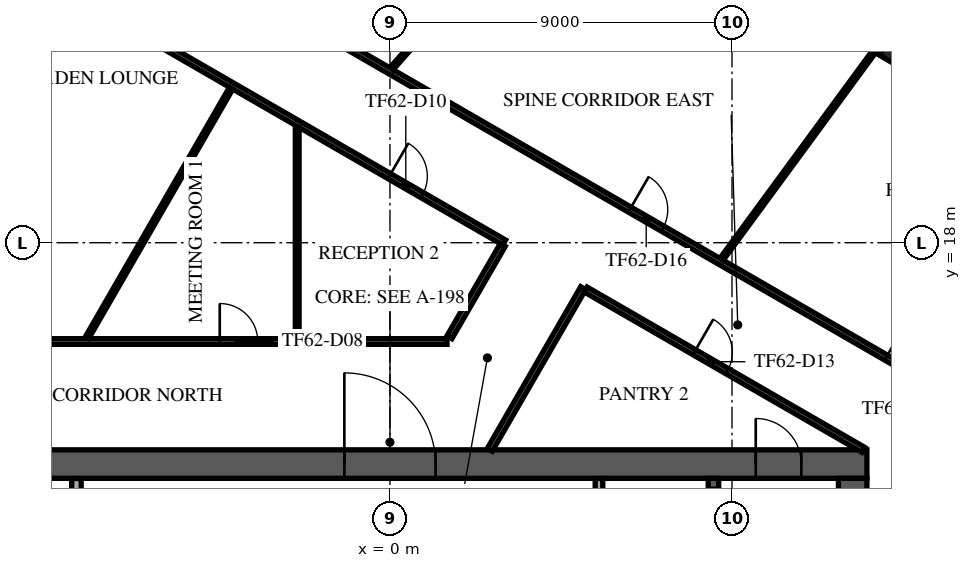
"""IFC4 building model, lengths in metres.
Left out: names, types, materials, properties, quantities, classifications, styles, units other than length and angle.
Written with IfcOpenShell. Run it as: python <this file> out.ifc"""

import sys

from ifc_helpers import new_model, si_unit, direction, frame, frame_2d, origin, origin_2d, place, context, subcontext, project, spatial, rectangle, extrude, element, fill, save


model = new_model("IFC4")
c1 = context("Model", 3, precision=1e-05, world=origin(), true_north=direction((0.0, 1.0)))
c2 = subcontext(c1, "Body", "Model", "MODEL_VIEW")
j1 = project(units=[si_unit("LENGTHUNIT", "METRE"), si_unit("PLANEANGLEUNIT", "RADIAN")], contexts=[c1])
p1 = place(None, origin())
s1 = spatial("IfcSite", under=j1, at=p1, CompositionType="ELEMENT")
p2 = place(p1, origin())
s2 = spatial("IfcBuilding", under=s1, at=p2, CompositionType="ELEMENT")
p3 = place(p2, frame((0.0, 0.0, 262.9)))
s3 = spatial("IfcBuildingStorey", under=s2, at=p3, CompositionType="ELEMENT", Elevation=262.9)
p4 = place(p3, frame((13.499, 23.094, 0.0), z_axis=(0.0, 0.0, 1.0), x_axis=(0.504643651291, 0.863327739165, 0.0)))
e1 = element("IfcColumn", 1, at=p4, inside=s3, PredefinedType="COLUMN", context=c2, shape_type="SweptSolid", body=[
    extrude(rectangle(XDim=0.9, YDim=0.9, at=origin_2d()), origin(), (0.0, 0.0, 1.0), 4.0),
])
p5 = place(p3, frame((-12.55, 12.175, 0.0), z_axis=(0.0, 0.0, 1.0), x_axis=(1.0, 0.0, 0.0)))
e2 = element("IfcWall", 2, at=p5, inside=s3, PredefinedType="SHEAR", context=c2, shape_type="SweptSolid", body=[
    extrude(rectangle(XDim=25.1, YDim=0.75, at=frame_2d((12.55, 0.0))), origin(), (0.0, 0.0, 1.0), 3.64),
])
p6 = place(p5, frame((11.35, 0.0, 0.0)))
e3 = element("IfcOpeningElement", 3, at=p6, cuts=e2, PredefinedType="OPENING", context=c2, shape_type="SweptSolid", body=[
    extrude(rectangle(XDim=2.4, YDim=2.4, at=frame_2d((1.2, 1.2))), frame((0.0, 0.385, 0.0), z_axis=(0.0, -1.0, 0.0), x_axis=(1.0, 0.0, 0.0)), (0.0, 0.0, 1.0), 0.77),
])
p7 = place(p5, frame((22.175, 0.0, 0.0)))
e4 = element("IfcOpeningElement", 4, at=p7, cuts=e2, PredefinedType="OPENING", context=c2, shape_type="SweptSolid", body=[
    extrude(rectangle(XDim=1.2, YDim=2.1, at=frame_2d((0.6, 1.05))), frame((0.0, 0.385, 0.0), z_axis=(0.0, -1.0, 0.0), x_axis=(1.0, 0.0, 0.0)), (0.0, 0.0, 1.0), 0.77),
])
p8 = place(p5, frame((1.15, 0.0, 0.0)))
e5 = element("IfcOpeningElement", 5, at=p8, cuts=e2, PredefinedType="OPENING", context=c2, shape_type="SweptSolid", body=[
    extrude(rectangle(XDim=1.0, YDim=2.1, at=frame_2d((0.5, 1.05))), frame((0.0, 0.385, 0.0), z_axis=(0.0, -1.0, 0.0), x_axis=(1.0, 0.0, 0.0)), (0.0, 0.0, 1.0), 0.77),
])
p9 = place(p3, frame((12.175, -11.8, 0.0), z_axis=(0.0, 0.0, 1.0), x_axis=(0.0, 1.0, 0.0)))
e6 = element("IfcWall", 6, at=p9, inside=s3, PredefinedType="SHEAR", context=c2, shape_type="SweptSolid", body=[
    extrude(rectangle(XDim=23.6, YDim=0.75, at=frame_2d((11.8, 0.0))), origin(), (0.0, 0.0, 1.0), 3.64),
])
p10 = place(p9, frame((10.6, 0.0, 0.0)))
e7 = element("IfcOpeningElement", 7, at=p10, cuts=e6, PredefinedType="OPENING", context=c2, shape_type="SweptSolid", body=[
    extrude(rectangle(XDim=2.4, YDim=2.4, at=frame_2d((1.2, 1.2))), frame((0.0, 0.385, 0.0), z_axis=(0.0, -1.0, 0.0), x_axis=(1.0, 0.0, 0.0)), (0.0, 0.0, 1.0), 0.77),
])
p11 = place(p3, frame((8.512, 4.55, 0.0), z_axis=(0.0, 0.0, 1.0), x_axis=(0.0, 1.0, 0.0)))
e8 = element("IfcWall", 8, at=p11, inside=s3, PredefinedType="SOLIDWALL", context=c2, shape_type="SweptSolid", body=[
    extrude(rectangle(XDim=7.25, YDim=0.275, at=frame_2d((3.625, 0.0))), origin(), (0.0, 0.0, 1.0), 3.64),
])
p12 = place(p11, frame((6.0, 0.0, 0.0)))
e9 = element("IfcOpeningElement", 9, at=p12, cuts=e8, PredefinedType="OPENING", context=c2, shape_type="SweptSolid", body=[
    extrude(rectangle(XDim=1.0, YDim=2.1, at=frame_2d((0.5, 1.05))), frame((0.0, 0.147, 0.0), z_axis=(0.0, -1.0, 0.0), x_axis=(1.0, 0.0, 0.0)), (0.0, 0.0, 1.0), 0.295),
])
p13 = place(p3, frame((-8.25, 8.805, 0.0), z_axis=(0.0, 0.0, 1.0), x_axis=(0.0, 1.0, 0.0)))
e10 = element("IfcWall", 10, at=p13, inside=s3, PredefinedType="PARTITIONING", context=c2, shape_type="SweptSolid", body=[
    extrude(rectangle(XDim=2.99, YDim=0.25, at=frame_2d((1.495, 0.0))), origin(), (0.0, 0.0, 1.0), 3.64),
])
p14 = place(p13, frame((0.895, 0.0, 0.0)))
e11 = element("IfcOpeningElement", 11, at=p14, cuts=e10, PredefinedType="OPENING", context=c2, shape_type="SweptSolid", body=[
    extrude(rectangle(XDim=1.0, YDim=2.1, at=frame_2d((0.5, 1.05))), frame((0.0, 0.135, 0.0), z_axis=(0.0, -1.0, 0.0), x_axis=(1.0, 0.0, 0.0)), (0.0, 0.0, 1.0), 0.27),
])
p15 = place(p3, frame((5.5, 8.805, 0.0), z_axis=(0.0, 0.0, 1.0), x_axis=(0.0, 1.0, 0.0)))
e12 = element("IfcWall", 12, at=p15, inside=s3, PredefinedType="PARTITIONING", context=c2, shape_type="SweptSolid", body=[
    extrude(rectangle(XDim=2.99, YDim=0.2, at=frame_2d((1.495, 0.0))), origin(), (0.0, 0.0, 1.0), 3.64),
])
p16 = place(p15, frame((0.532, 0.0, 0.0)))
e13 = element("IfcOpeningElement", 13, at=p16, cuts=e12, PredefinedType="OPENING", context=c2, shape_type="SweptSolid", body=[
    extrude(rectangle(XDim=1.8, YDim=2.1, at=frame_2d((0.9, 1.05))), frame((0.0, 0.11, 0.0), z_axis=(0.0, -1.0, 0.0), x_axis=(1.0, 0.0, 0.0)), (0.0, 0.0, 1.0), 0.22),
])
p17 = place(p3, frame((-8.015, 32.917, 0.0), z_axis=(0.0, 0.0, 1.0), x_axis=(-0.500001675963, -0.866024436165, 0.0)))
e14 = element("IfcWall", 14, at=p17, inside=s3, PredefinedType="STANDARD", context=c2, shape_type="SweptSolid", body=[
    extrude(rectangle(XDim=48.843, YDim=0.6, at=frame_2d((24.421, 0.0))), origin(), (0.0, 0.0, 1.0), 3.64),
])
p18 = place(p17, frame((1.22, 0.0, 0.9)))
e15 = element("IfcOpeningElement", 15, at=p18, cuts=e14, PredefinedType="OPENING", context=c2, shape_type="SweptSolid", body=[
    extrude(rectangle(XDim=2.0, YDim=2.1, at=frame_2d((1.0, 1.05))), frame((0.0, 0.31, 0.0), z_axis=(0.0, -1.0, 0.0), x_axis=(1.0, 0.0, 0.0)), (0.0, 0.0, 1.0), 0.62),
])
p19 = place(p17, frame((5.66, 0.0, 0.9)))
e16 = element("IfcOpeningElement", 16, at=p19, cuts=e14, PredefinedType="OPENING", context=c2, shape_type="SweptSolid", body=[
    extrude(rectangle(XDim=2.0, YDim=2.1, at=frame_2d((1.0, 1.05))), frame((0.0, 0.31, 0.0), z_axis=(0.0, -1.0, 0.0), x_axis=(1.0, 0.0, 0.0)), (0.0, 0.0, 1.0), 0.62),
])
p20 = place(p17, frame((10.101, 0.0, 0.9)))
e17 = element("IfcOpeningElement", 17, at=p20, cuts=e14, PredefinedType="OPENING", context=c2, shape_type="SweptSolid", body=[
    extrude(rectangle(XDim=2.0, YDim=2.1, at=frame_2d((1.0, 1.05))), frame((0.0, 0.31, 0.0), z_axis=(0.0, -1.0, 0.0), x_axis=(1.0, 0.0, 0.0)), (0.0, 0.0, 1.0), 0.62),
])
p21 = place(p17, frame((14.541, 0.0, 0.9)))
e18 = element("IfcOpeningElement", 18, at=p21, cuts=e14, PredefinedType="OPENING", context=c2, shape_type="SweptSolid", body=[
    extrude(rectangle(XDim=2.0, YDim=2.1, at=frame_2d((1.0, 1.05))), frame((0.0, 0.31, 0.0), z_axis=(0.0, -1.0, 0.0), x_axis=(1.0, 0.0, 0.0)), (0.0, 0.0, 1.0), 0.62),
])
p22 = place(p17, frame((18.981, 0.0, 0.9)))
e19 = element("IfcOpeningElement", 19, at=p22, cuts=e14, PredefinedType="OPENING", context=c2, shape_type="SweptSolid", body=[
    extrude(rectangle(XDim=2.0, YDim=2.1, at=frame_2d((1.0, 1.05))), frame((0.0, 0.31, 0.0), z_axis=(0.0, -1.0, 0.0), x_axis=(1.0, 0.0, 0.0)), (0.0, 0.0, 1.0), 0.62),
])
p23 = place(p17, frame((23.422, 0.0, 0.9)))
e20 = element("IfcOpeningElement", 20, at=p23, cuts=e14, PredefinedType="OPENING", context=c2, shape_type="SweptSolid", body=[
    extrude(rectangle(XDim=2.0, YDim=2.1, at=frame_2d((1.0, 1.05))), frame((0.0, 0.31, 0.0), z_axis=(0.0, -1.0, 0.0), x_axis=(1.0, 0.0, 0.0)), (0.0, 0.0, 1.0), 0.62),
])
p24 = place(p17, frame((27.862, 0.0, 0.9)))
e21 = element("IfcOpeningElement", 21, at=p24, cuts=e14, PredefinedType="OPENING", context=c2, shape_type="SweptSolid", body=[
    extrude(rectangle(XDim=2.0, YDim=2.1, at=frame_2d((1.0, 1.05))), frame((0.0, 0.31, 0.0), z_axis=(0.0, -1.0, 0.0), x_axis=(1.0, 0.0, 0.0)), (0.0, 0.0, 1.0), 0.62),
])
p25 = place(p17, frame((32.302, 0.0, 0.9)))
e22 = element("IfcOpeningElement", 22, at=p25, cuts=e14, PredefinedType="OPENING", context=c2, shape_type="SweptSolid", body=[
    extrude(rectangle(XDim=2.0, YDim=2.1, at=frame_2d((1.0, 1.05))), frame((0.0, 0.31, 0.0), z_axis=(0.0, -1.0, 0.0), x_axis=(1.0, 0.0, 0.0)), (0.0, 0.0, 1.0), 0.62),
])
p26 = place(p17, frame((36.742, 0.0, 0.9)))
e23 = element("IfcOpeningElement", 23, at=p26, cuts=e14, PredefinedType="OPENING", context=c2, shape_type="SweptSolid", body=[
    extrude(rectangle(XDim=2.0, YDim=2.1, at=frame_2d((1.0, 1.05))), frame((0.0, 0.31, 0.0), z_axis=(0.0, -1.0, 0.0), x_axis=(1.0, 0.0, 0.0)), (0.0, 0.0, 1.0), 0.62),
])
p27 = place(p17, frame((41.183, 0.0, 0.9)))
e24 = element("IfcOpeningElement", 24, at=p27, cuts=e14, PredefinedType="OPENING", context=c2, shape_type="SweptSolid", body=[
    extrude(rectangle(XDim=2.0, YDim=2.1, at=frame_2d((1.0, 1.05))), frame((0.0, 0.31, 0.0), z_axis=(0.0, -1.0, 0.0), x_axis=(1.0, 0.0, 0.0)), (0.0, 0.0, 1.0), 0.62),
])
p28 = place(p17, frame((45.623, 0.0, 0.9)))
e25 = element("IfcOpeningElement", 25, at=p28, cuts=e14, PredefinedType="OPENING", context=c2, shape_type="SweptSolid", body=[
    extrude(rectangle(XDim=2.0, YDim=2.1, at=frame_2d((1.0, 1.05))), frame((0.0, 0.31, 0.0), z_axis=(0.0, -1.0, 0.0), x_axis=(1.0, 0.0, 0.0)), (0.0, 0.0, 1.0), 0.62),
])
p29 = place(p3, frame((30.476, 16.699, 0.0), z_axis=(0.0, 0.0, 1.0), x_axis=(-0.866025061514, 0.500000592829, 0.0)))
e26 = element("IfcWall", 26, at=p29, inside=s3, PredefinedType="STANDARD", context=c2, shape_type="SweptSolid", body=[
    extrude(rectangle(XDim=36.243, YDim=0.6, at=frame_2d((18.122, 0.0))), origin(), (0.0, 0.0, 1.0), 3.64),
])
p30 = place(p29, frame((1.215, 0.0, 0.9)))
e27 = element("IfcOpeningElement", 27, at=p30, cuts=e26, PredefinedType="OPENING", context=c2, shape_type="SweptSolid", body=[
    extrude(rectangle(XDim=2.1, YDim=2.1, at=frame_2d((1.05, 1.05))), frame((0.0, 0.31, 0.0), z_axis=(0.0, -1.0, 0.0), x_axis=(1.0, 0.0, 0.0)), (0.0, 0.0, 1.0), 0.62),
])
p31 = place(p29, frame((5.746, 0.0, 0.9)))
e28 = element("IfcOpeningElement", 28, at=p31, cuts=e26, PredefinedType="OPENING", context=c2, shape_type="SweptSolid", body=[
    extrude(rectangle(XDim=2.1, YDim=2.1, at=frame_2d((1.05, 1.05))), frame((0.0, 0.31, 0.0), z_axis=(0.0, -1.0, 0.0), x_axis=(1.0, 0.0, 0.0)), (0.0, 0.0, 1.0), 0.62),
])
p32 = place(p29, frame((10.276, 0.0, 0.9)))
e29 = element("IfcOpeningElement", 29, at=p32, cuts=e26, PredefinedType="OPENING", context=c2, shape_type="SweptSolid", body=[
    extrude(rectangle(XDim=2.1, YDim=2.1, at=frame_2d((1.05, 1.05))), frame((0.0, 0.31, 0.0), z_axis=(0.0, -1.0, 0.0), x_axis=(1.0, 0.0, 0.0)), (0.0, 0.0, 1.0), 0.62),
])
p33 = place(p29, frame((14.806, 0.0, 0.9)))
e30 = element("IfcOpeningElement", 30, at=p33, cuts=e26, PredefinedType="OPENING", context=c2, shape_type="SweptSolid", body=[
    extrude(rectangle(XDim=2.1, YDim=2.1, at=frame_2d((1.05, 1.05))), frame((0.0, 0.31, 0.0), z_axis=(0.0, -1.0, 0.0), x_axis=(1.0, 0.0, 0.0)), (0.0, 0.0, 1.0), 0.62),
])
p34 = place(p29, frame((19.337, 0.0, 0.9)))
e31 = element("IfcOpeningElement", 31, at=p34, cuts=e26, PredefinedType="OPENING", context=c2, shape_type="SweptSolid", body=[
    extrude(rectangle(XDim=2.1, YDim=2.1, at=frame_2d((1.05, 1.05))), frame((0.0, 0.31, 0.0), z_axis=(0.0, -1.0, 0.0), x_axis=(1.0, 0.0, 0.0)), (0.0, 0.0, 1.0), 0.62),
])
p35 = place(p29, frame((23.867, 0.0, 0.9)))
e32 = element("IfcOpeningElement", 32, at=p35, cuts=e26, PredefinedType="OPENING", context=c2, shape_type="SweptSolid", body=[
    extrude(rectangle(XDim=2.1, YDim=2.1, at=frame_2d((1.05, 1.05))), frame((0.0, 0.31, 0.0), z_axis=(0.0, -1.0, 0.0), x_axis=(1.0, 0.0, 0.0)), (0.0, 0.0, 1.0), 0.62),
])
p36 = place(p29, frame((28.398, 0.0, 0.9)))
e33 = element("IfcOpeningElement", 33, at=p36, cuts=e26, PredefinedType="OPENING", context=c2, shape_type="SweptSolid", body=[
    extrude(rectangle(XDim=2.1, YDim=2.1, at=frame_2d((1.05, 1.05))), frame((0.0, 0.31, 0.0), z_axis=(0.0, -1.0, 0.0), x_axis=(1.0, 0.0, 0.0)), (0.0, 0.0, 1.0), 0.62),
])
p37 = place(p29, frame((32.928, 0.0, 0.9)))
e34 = element("IfcOpeningElement", 34, at=p37, cuts=e26, PredefinedType="OPENING", context=c2, shape_type="SweptSolid", body=[
    extrude(rectangle(XDim=2.1, YDim=2.1, at=frame_2d((1.05, 1.05))), frame((0.0, 0.31, 0.0), z_axis=(0.0, -1.0, 0.0), x_axis=(1.0, 0.0, 0.0)), (0.0, 0.0, 1.0), 0.62),
])
p38 = place(p3, frame((-15.325, 15.4, 0.0), z_axis=(0.0, 0.0, 1.0), x_axis=(1.0, 0.0, 0.0)))
e35 = element("IfcWall", 35, at=p38, inside=s3, PredefinedType="PARTITIONING", context=c2, shape_type="SweptSolid", body=[
    extrude(rectangle(XDim=16.826, YDim=0.15, at=frame_2d((8.413, 0.0))), origin(), (0.0, 0.0, 1.0), 3.24),
])
p39 = place(p38, frame((3.3, 0.0, 0.0)))
e36 = element("IfcOpeningElement", 36, at=p39, cuts=e35, PredefinedType="OPENING", context=c2, shape_type="SweptSolid", body=[
    extrude(rectangle(XDim=1.8, YDim=2.1, at=frame_2d((0.9, 1.05))), frame((0.0, 0.085, 0.0), z_axis=(0.0, -1.0, 0.0), x_axis=(1.0, 0.0, 0.0)), (0.0, 0.0, 1.0), 0.17),
])
p40 = place(p38, frame((10.846, 0.0, 0.0)))
e37 = element("IfcOpeningElement", 37, at=p40, cuts=e35, PredefinedType="OPENING", context=c2, shape_type="SweptSolid", body=[
    extrude(rectangle(XDim=1.0, YDim=2.1, at=frame_2d((0.5, 1.05))), frame((0.0, 0.085, 0.0), z_axis=(0.0, -1.0, 0.0), x_axis=(1.0, 0.0, 0.0)), (0.0, 0.0, 1.0), 0.17),
])
p41 = place(p3, frame((-8.447, 24.618, 0.0), z_axis=(0.0, 0.0, 1.0), x_axis=(0.866030646256, -0.499990919662, 0.0)))
e38 = element("IfcWall", 38, at=p41, inside=s3, PredefinedType="PARTITIONING", context=c2, shape_type="SweptSolid", body=[
    extrude(rectangle(XDim=13.225, YDim=0.15, at=frame_2d((6.612, 0.0))), origin(), (0.0, 0.0, 1.0), 3.04),
])
p42 = place(p41, frame((0.55, 0.0, 0.0)))
e39 = element("IfcOpeningElement", 39, at=p42, cuts=e38, PredefinedType="OPENING", context=c2, shape_type="SweptSolid", body=[
    extrude(rectangle(XDim=1.0, YDim=2.1, at=frame_2d((0.5, 1.05))), frame((0.0, 0.085, 0.0), z_axis=(0.0, -1.0, 0.0), x_axis=(1.0, 0.0, 0.0)), (0.0, 0.0, 1.0), 0.17),
])
p43 = place(p41, frame((9.735, 0.0, 0.0)))
e40 = element("IfcOpeningElement", 40, at=p43, cuts=e38, PredefinedType="OPENING", context=c2, shape_type="SweptSolid", body=[
    extrude(rectangle(XDim=1.0, YDim=2.1, at=frame_2d((0.5, 1.05))), frame((0.0, 0.085, 0.0), z_axis=(0.0, -1.0, 0.0), x_axis=(1.0, 0.0, 0.0)), (0.0, 0.0, 1.0), 0.17),
])
p44 = place(p3, frame((-7.247, 26.698, 0.0), z_axis=(0.0, 0.0, 1.0), x_axis=(0.866022442497, -0.500005129065, 0.0)))
e41 = element("IfcWall", 41, at=p44, inside=s3, PredefinedType="PARTITIONING", context=c2, shape_type="SweptSolid", body=[
    extrude(rectangle(XDim=39.325, YDim=0.15, at=frame_2d((19.662, 0.0))), origin(), (0.0, 0.0, 1.0), 3.04),
])
p45 = place(p44, frame((15.654, 0.0, 0.0)))
e42 = element("IfcOpeningElement", 42, at=p45, cuts=e41, PredefinedType="OPENING", context=c2, shape_type="SweptSolid", body=[
    extrude(rectangle(XDim=1.0, YDim=2.1, at=frame_2d((0.5, 1.05))), frame((0.0, 0.085, 0.0), z_axis=(0.0, -1.0, 0.0), x_axis=(1.0, 0.0, 0.0)), (0.0, 0.0, 1.0), 0.17),
])
p46 = place(p44, frame((23.442, 0.0, 0.0)))
e43 = element("IfcOpeningElement", 43, at=p46, cuts=e41, PredefinedType="OPENING", context=c2, shape_type="SweptSolid", body=[
    extrude(rectangle(XDim=1.0, YDim=2.1, at=frame_2d((0.5, 1.05))), frame((0.0, 0.085, 0.0), z_axis=(0.0, -1.0, 0.0), x_axis=(1.0, 0.0, 0.0)), (0.0, 0.0, 1.0), 0.17),
])
p47 = place(p44, frame((31.841, 0.0, 0.0)))
e44 = element("IfcOpeningElement", 44, at=p47, cuts=e41, PredefinedType="OPENING", context=c2, shape_type="SweptSolid", body=[
    extrude(rectangle(XDim=1.0, YDim=2.1, at=frame_2d((0.5, 1.05))), frame((0.0, 0.085, 0.0), z_axis=(0.0, -1.0, 0.0), x_axis=(1.0, 0.0, 0.0)), (0.0, 0.0, 1.0), 0.17),
])
p48 = place(p44, frame((36.955, 0.0, 0.0)))
e45 = element("IfcOpeningElement", 45, at=p48, cuts=e41, PredefinedType="OPENING", context=c2, shape_type="SweptSolid", body=[
    extrude(rectangle(XDim=1.0, YDim=2.1, at=frame_2d((0.5, 1.05))), frame((0.0, 0.085, 0.0), z_axis=(0.0, -1.0, 0.0), x_axis=(1.0, 0.0, 0.0)), (0.0, 0.0, 1.0), 0.17),
])
p49 = place(p3, frame((1.566, 15.512, 0.0), z_axis=(0.0, 0.0, 1.0), x_axis=(0.500136902793, 0.865946348491, 0.0)))
e46 = element("IfcWall", 46, at=p49, inside=s3, PredefinedType="PARTITIONING", context=c2, shape_type="SweptSolid", body=[
    extrude(rectangle(XDim=2.804, YDim=0.15, at=frame_2d((1.402, 0.0))), origin(), (0.0, 0.0, 1.0), 3.64),
])
p50 = place(p3, frame((2.627, 12.55, 0.0), z_axis=(0.0, 0.0, 1.0), x_axis=(0.50013524008, 0.865947308807, 0.0)))
e47 = element("IfcWall", 47, at=p50, inside=s3, PredefinedType="PARTITIONING", context=c2, shape_type="SweptSolid", body=[
    extrude(rectangle(XDim=4.915, YDim=0.15, at=frame_2d((2.458, 0.0))), origin(), (0.0, 0.0, 1.0), 3.24),
])
p51 = place(p3, frame((5.15, 16.769, 0.0), z_axis=(0.0, 0.0, 1.0), x_axis=(0.866010168016, -0.500026388196, 0.0)))
e48 = element("IfcWall", 48, at=p51, inside=s3, PredefinedType="PARTITIONING", context=c2, shape_type="SweptSolid", body=[
    extrude(rectangle(XDim=8.437, YDim=0.15, at=frame_2d((4.218, 0.0))), origin(), (0.0, 0.0, 1.0), 3.24),
])
p52 = place(p51, frame((3.3, 0.0, 0.0)))
e49 = element("IfcOpeningElement", 49, at=p52, cuts=e48, PredefinedType="OPENING", context=c2, shape_type="SweptSolid", body=[
    extrude(rectangle(XDim=1.0, YDim=2.1, at=frame_2d((0.5, 1.05))), frame((0.0, 0.085, 0.0), z_axis=(0.0, -1.0, 0.0), x_axis=(1.0, 0.0, 0.0)), (0.0, 0.0, 1.0), 0.17),
])
p53 = place(p3, frame((-7.971, 15.5, 0.0), z_axis=(0.0, 0.0, 1.0), x_axis=(0.499964887799, 0.866045674874, 0.0)))
e50 = element("IfcWall", 50, at=p53, inside=s3, PredefinedType="PARTITIONING", context=c2, shape_type="SweptSolid", body=[
    extrude(rectangle(XDim=7.584, YDim=0.1, at=frame_2d((3.792, 0.0))), origin(), (0.0, 0.0, 1.0), 3.24),
])
p54 = place(p3, frame((-2.441, 15.475, 0.0), z_axis=(0.0, 0.0, 1.0), x_axis=(0.0, 1.0, 0.0)))
e51 = element("IfcWall", 51, at=p54, inside=s3, PredefinedType="PARTITIONING", context=c2, shape_type="SweptSolid", body=[
    extrude(rectangle(XDim=5.56, YDim=0.1, at=frame_2d((2.78, 0.0))), origin(), (0.0, 0.0, 1.0), 3.64),
])
p55 = place(p3, frame((0.045, 22.586, 0.0), z_axis=(0.0, 0.0, 1.0), x_axis=(0.662385571542, 0.749163102811, 0.0)))
e52 = element("IfcWall", 52, at=p55, inside=s3, PredefinedType="PARTITIONING", context=c2, shape_type="SweptSolid", body=[
    extrude(rectangle(XDim=10.016, YDim=0.1, at=frame_2d((5.008, 0.0))), origin(), (0.0, 0.0, 1.0), 3.04),
])
p56 = place(p3, frame((8.728, 17.567, 0.0), z_axis=(0.0, 0.0, 1.0), x_axis=(0.591764258376, 0.806111073307, 0.0)))
e53 = element("IfcWall", 53, at=p56, inside=s3, PredefinedType="PARTITIONING", context=c2, shape_type="SweptSolid", body=[
    extrude(rectangle(XDim=9.88, YDim=0.1, at=frame_2d((4.94, 0.0))), origin(), (0.0, 0.0, 1.0), 3.04),
])
p57 = place(p6, origin())
e54 = element("IfcDoor", 54, at=p57, inside=s3, OperationType="SINGLE_SWING_LEFT", PredefinedType="DOOR", context=c2, shape_type="SweptSolid", body=[
    extrude(rectangle(XDim=2.4, YDim=2.4, at=frame_2d((1.2, 1.2))), frame((0.0, 0.025, 0.0), z_axis=(0.0, -1.0, 0.0), x_axis=(1.0, 0.0, 0.0)), (0.0, 0.0, 1.0), 0.05),
])
fill(e3, e54)
p58 = place(p7, origin())
e55 = element("IfcDoor", 55, at=p58, inside=s3, OperationType="SINGLE_SWING_LEFT", PredefinedType="DOOR", context=c2, shape_type="SweptSolid", body=[
    extrude(rectangle(XDim=1.2, YDim=2.1, at=frame_2d((0.6, 1.05))), frame((0.0, 0.025, 0.0), z_axis=(0.0, -1.0, 0.0), x_axis=(1.0, 0.0, 0.0)), (0.0, 0.0, 1.0), 0.05),
])
fill(e4, e55)
p59 = place(p40, origin())
e56 = element("IfcDoor", 56, at=p59, inside=s3, OperationType="SINGLE_SWING_RIGHT", PredefinedType="DOOR", context=c2, shape_type="SweptSolid", body=[
    extrude(rectangle(XDim=1.0, YDim=2.1, at=frame_2d((0.5, 1.05))), frame((0.0, 0.025, 0.0), z_axis=(0.0, -1.0, 0.0), x_axis=(1.0, 0.0, 0.0)), (0.0, 0.0, 1.0), 0.05),
])
fill(e37, e56)
p60 = place(p43, frame((1.0, 0.0, 0.0), z_axis=(0.0, 0.0, 1.0), x_axis=(-1.0, 0.0, 0.0)))
e57 = element("IfcDoor", 57, at=p60, inside=s3, OperationType="SINGLE_SWING_LEFT", PredefinedType="DOOR", context=c2, shape_type="SweptSolid", body=[
    extrude(rectangle(XDim=1.0, YDim=2.1, at=frame_2d((0.5, 1.05))), frame((0.0, 0.025, 0.0), z_axis=(0.0, -1.0, 0.0), x_axis=(1.0, 0.0, 0.0)), (0.0, 0.0, 1.0), 0.05),
])
fill(e40, e57)
p61 = place(p52, frame((1.0, 0.0, 0.0), z_axis=(0.0, 0.0, 1.0), x_axis=(-1.0, 0.0, 0.0)))
e58 = element("IfcDoor", 58, at=p61, inside=s3, OperationType="SINGLE_SWING_RIGHT", PredefinedType="DOOR", context=c2, shape_type="SweptSolid", body=[
    extrude(rectangle(XDim=1.0, YDim=2.1, at=frame_2d((0.5, 1.05))), frame((0.0, 0.025, 0.0), z_axis=(0.0, -1.0, 0.0), x_axis=(1.0, 0.0, 0.0)), (0.0, 0.0, 1.0), 0.05),
])
fill(e49, e58)
p62 = place(p45, origin())
e59 = element("IfcDoor", 59, at=p62, inside=s3, OperationType="SINGLE_SWING_RIGHT", PredefinedType="DOOR", context=c2, shape_type="SweptSolid", body=[
    extrude(rectangle(XDim=1.0, YDim=2.1, at=frame_2d((0.5, 1.05))), frame((0.0, 0.025, 0.0), z_axis=(0.0, -1.0, 0.0), x_axis=(1.0, 0.0, 0.0)), (0.0, 0.0, 1.0), 0.05),
])
fill(e42, e59)
p63 = place(p46, origin())
e60 = element("IfcDoor", 60, at=p63, inside=s3, OperationType="SINGLE_SWING_RIGHT", PredefinedType="DOOR", context=c2, shape_type="SweptSolid", body=[
    extrude(rectangle(XDim=1.0, YDim=2.1, at=frame_2d((0.5, 1.05))), frame((0.0, 0.025, 0.0), z_axis=(0.0, -1.0, 0.0), x_axis=(1.0, 0.0, 0.0)), (0.0, 0.0, 1.0), 0.05),
])
fill(e43, e60)
save(model, sys.argv[1])
